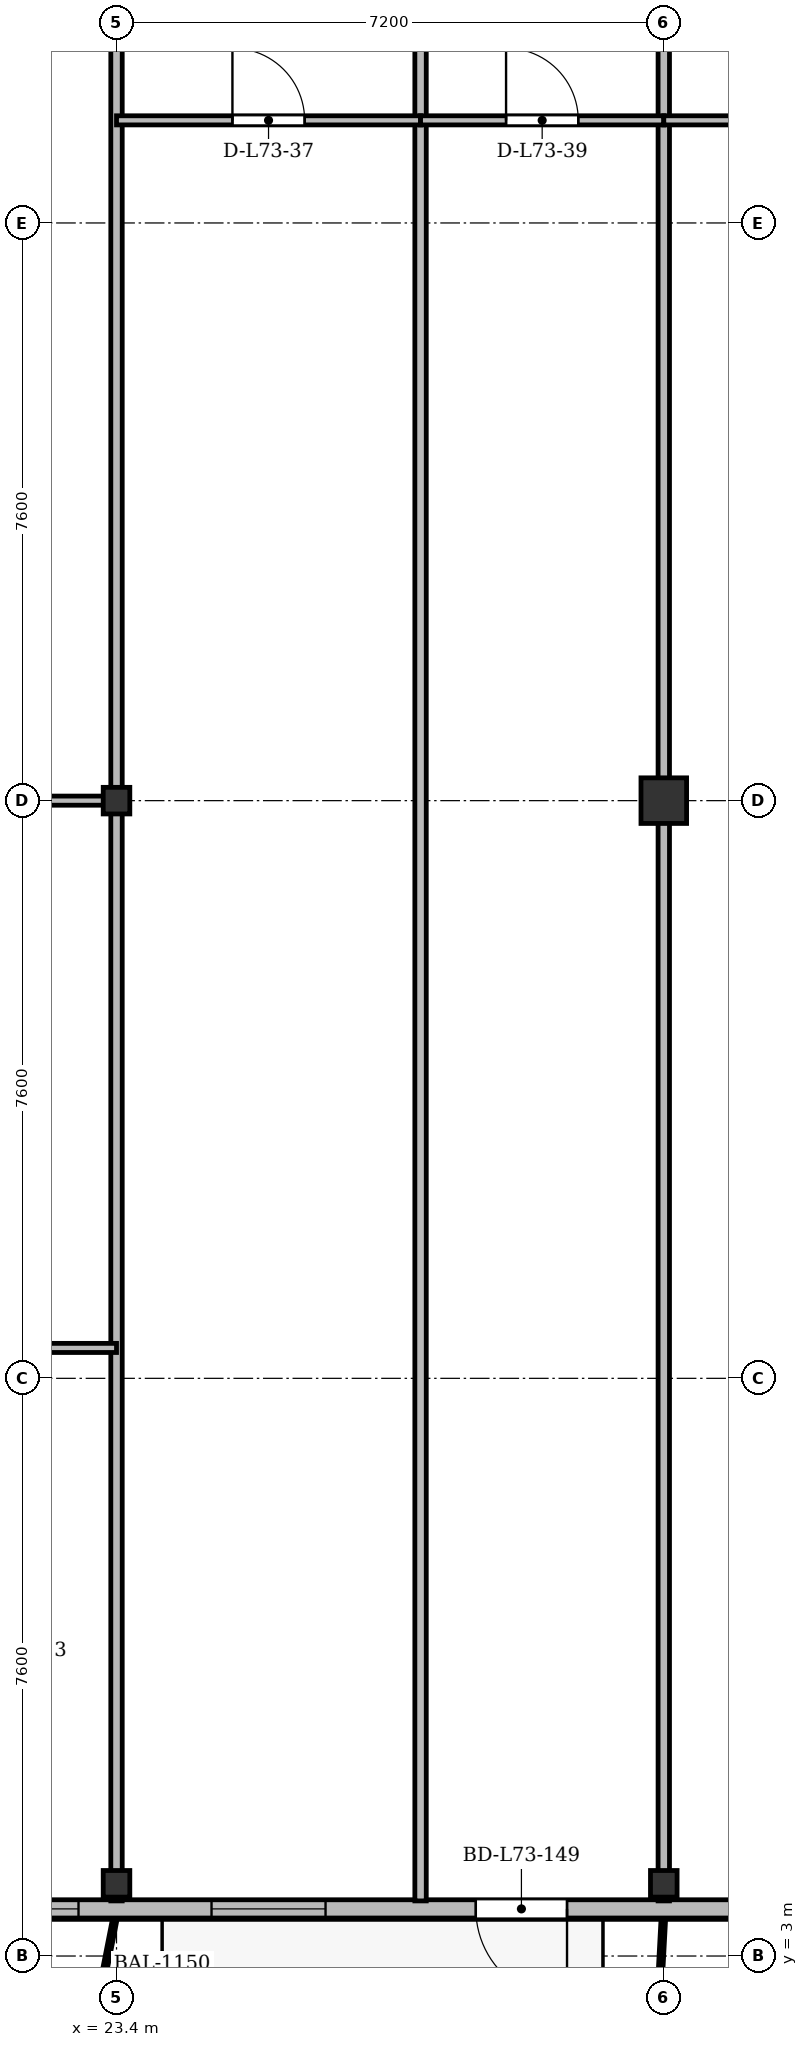
"""IFC4 building model, lengths in metres.
Left out: names, types, materials, properties, quantities, classifications, styles, units other than length and angle.
Written with IfcOpenShell. Run it as: python <this file> out.ifc"""

import sys

from ifc_helpers import new_model, si_unit, direction, frame, frame_2d, origin, origin_2d, place, context, subcontext, project, spatial, rectangle, i_section, extrude, source, transform, mapped, element, fill, save


model = new_model("IFC4")
c1 = context("Model", 3, precision=1e-05, world=origin(), true_north=direction((0.0, 1.0)))
c2 = subcontext(c1, "Body", "Model", "MODEL_VIEW")
j1 = project(units=[si_unit("LENGTHUNIT", "METRE"), si_unit("PLANEANGLEUNIT", "RADIAN")], contexts=[c1])
p1 = place(None, origin())
s1 = spatial("IfcSite", under=j1, at=p1, CompositionType="ELEMENT")
p2 = place(p1, origin())
s2 = spatial("IfcBuilding", under=s1, at=p2, CompositionType="ELEMENT")
p3 = place(p2, frame((0.0, 0.0, 281.1)))
s3 = spatial("IfcBuildingStorey", under=s2, at=p3, CompositionType="ELEMENT", Elevation=281.1)
m1 = source(origin(), c2, "Body", "SweptSolid", [
    extrude(i_section(OverallWidth=0.35, OverallDepth=0.35, WebThickness=0.018, FlangeThickness=0.028, at=origin_2d()), origin(), (0.0, 0.0, 1.0), 3.6),
])
for number, where, z_axis, x_axis in (
    (1, (23.4, 3.95, 0.0), (0.0, 0.0, 1.0), (1.0, 0.0, 0.0)),
    (2, (23.4, 18.2, 0.0), (0.0, 0.0, 1.0), (1.0, 0.0, 0.0)),
    (3, (30.6, 3.95, 0.0), (0.0, 0.0, 1.0), (1.0, 0.0, 0.0)),
):
    element("IfcColumn", number, at=place(p3, frame(where, z_axis=z_axis, x_axis=x_axis)), inside=s3, PredefinedType="COLUMN", context=c2, shape_type="MappedRepresentation", body=[
        mapped(m1, transform((0.0, 0.0, 0.0), x_axis=(1.0, 0.0, 0.0), y_axis=(0.0, 1.0, 0.0), z_axis=(0.0, 0.0, 1.0), scale=1.0)),
    ])
m2 = source(origin(), c2, "Body", "SweptSolid", [
    extrude(rectangle(XDim=0.6, YDim=0.6, at=origin_2d()), origin(), (0.0, 0.0, 1.0), 3.6),
])
p4 = place(p3, frame((30.6, 18.2, 0.0), z_axis=(0.0, 0.0, 1.0), x_axis=(1.0, 0.0, 0.0)))
e4 = element("IfcColumn", 4, at=p4, inside=s3, PredefinedType="COLUMN", context=c2, shape_type="MappedRepresentation", body=[
    mapped(m2, transform((0.0, 0.0, 0.0), x_axis=(1.0, 0.0, 0.0), y_axis=(0.0, 1.0, 0.0), z_axis=(0.0, 0.0, 1.0), scale=1.0)),
])
p5 = place(p3, frame((63.2, 3.62, 0.0), z_axis=(0.0, 0.0, 1.0), x_axis=(-1.0, 0.0, 0.0)))
e5 = element("IfcWall", 5, at=p5, inside=s3, PredefinedType="SOLIDWALL", context=c2, shape_type="SweptSolid", body=[
    extrude(rectangle(XDim=52.0, YDim=0.24, at=frame_2d((26.0, 0.0))), origin(), (0.0, 0.0, 1.0), 3.37),
])
p6 = place(p5, frame((0.745, 0.0, 0.9)))
e6 = element("IfcOpeningElement", 6, at=p6, cuts=e5, PredefinedType="OPENING", context=c2, shape_type="SweptSolid", body=[
    extrude(rectangle(XDim=2.0, YDim=1.95, at=frame_2d((1.0, 0.975))), frame((0.0, 0.13, 0.0), z_axis=(0.0, -1.0, 0.0), x_axis=(1.0, 0.0, 0.0)), (0.0, 0.0, 1.0), 0.26),
])
p7 = place(p5, frame((4.793, 0.0, 0.9)))
e7 = element("IfcOpeningElement", 7, at=p7, cuts=e5, PredefinedType="OPENING", context=c2, shape_type="SweptSolid", body=[
    extrude(rectangle(XDim=1.35, YDim=1.5, at=frame_2d((0.675, 0.75))), frame((0.0, 0.13, 0.0), z_axis=(0.0, -1.0, 0.0), x_axis=(1.0, 0.0, 0.0)), (0.0, 0.0, 1.0), 0.26),
])
p8 = place(p5, frame((6.685, 0.0, 0.0)))
e8 = element("IfcOpeningElement", 8, at=p8, cuts=e5, PredefinedType="OPENING", context=c2, shape_type="SweptSolid", body=[
    extrude(rectangle(XDim=1.2, YDim=2.2, at=frame_2d((0.6, 1.1))), frame((0.0, 0.13, 0.0), z_axis=(0.0, -1.0, 0.0), x_axis=(1.0, 0.0, 0.0)), (0.0, 0.0, 1.0), 0.26),
])
p9 = place(p5, frame((9.634, 0.0, 0.9)))
e9 = element("IfcOpeningElement", 9, at=p9, cuts=e5, PredefinedType="OPENING", context=c2, shape_type="SweptSolid", body=[
    extrude(rectangle(XDim=2.2, YDim=1.8, at=frame_2d((1.1, 0.9))), frame((0.0, 0.13, 0.0), z_axis=(0.0, -1.0, 0.0), x_axis=(1.0, 0.0, 0.0)), (0.0, 0.0, 1.0), 0.26),
])
p10 = place(p5, frame((13.45, 0.0, 0.9)))
e10 = element("IfcOpeningElement", 10, at=p10, cuts=e5, PredefinedType="OPENING", context=c2, shape_type="SweptSolid", body=[
    extrude(rectangle(XDim=1.5, YDim=1.75, at=frame_2d((0.75, 0.875))), frame((0.0, 0.13, 0.0), z_axis=(0.0, -1.0, 0.0), x_axis=(1.0, 0.0, 0.0)), (0.0, 0.0, 1.0), 0.26),
])
p11 = place(p5, frame((16.8, 0.0, 0.9)))
e11 = element("IfcOpeningElement", 11, at=p11, cuts=e5, PredefinedType="OPENING", context=c2, shape_type="SweptSolid", body=[
    extrude(rectangle(XDim=2.0, YDim=1.95, at=frame_2d((1.0, 0.975))), frame((0.0, 0.13, 0.0), z_axis=(0.0, -1.0, 0.0), x_axis=(1.0, 0.0, 0.0)), (0.0, 0.0, 1.0), 0.26),
])
p12 = place(p5, frame((21.375, 0.0, 0.9)))
e12 = element("IfcOpeningElement", 12, at=p12, cuts=e5, PredefinedType="OPENING", context=c2, shape_type="SweptSolid", body=[
    extrude(rectangle(XDim=1.65, YDim=1.85, at=frame_2d((0.825, 0.925))), frame((0.0, 0.13, 0.0), z_axis=(0.0, -1.0, 0.0), x_axis=(1.0, 0.0, 0.0)), (0.0, 0.0, 1.0), 0.26),
])
p13 = place(p5, frame((27.9, 0.0, 0.9)))
e13 = element("IfcOpeningElement", 13, at=p13, cuts=e5, PredefinedType="OPENING", context=c2, shape_type="SweptSolid", body=[
    extrude(rectangle(XDim=1.8, YDim=1.8, at=frame_2d((0.9, 0.9))), frame((0.0, 0.13, 0.0), z_axis=(0.0, -1.0, 0.0), x_axis=(1.0, 0.0, 0.0)), (0.0, 0.0, 1.0), 0.26),
])
p14 = place(p5, frame((33.873, 0.0, 0.0)))
e14 = element("IfcOpeningElement", 14, at=p14, cuts=e5, PredefinedType="OPENING", context=c2, shape_type="SweptSolid", body=[
    extrude(rectangle(XDim=1.2, YDim=2.2, at=frame_2d((0.6, 1.1))), frame((0.0, 0.13, 0.0), z_axis=(0.0, -1.0, 0.0), x_axis=(1.0, 0.0, 0.0)), (0.0, 0.0, 1.0), 0.26),
])
p15 = place(p5, frame((37.05, 0.0, 0.9)))
e15 = element("IfcOpeningElement", 15, at=p15, cuts=e5, PredefinedType="OPENING", context=c2, shape_type="SweptSolid", body=[
    extrude(rectangle(XDim=1.5, YDim=1.75, at=frame_2d((0.75, 0.875))), frame((0.0, 0.13, 0.0), z_axis=(0.0, -1.0, 0.0), x_axis=(1.0, 0.0, 0.0)), (0.0, 0.0, 1.0), 0.26),
])
p16 = place(p5, frame((40.3, 0.0, 0.9)))
e16 = element("IfcOpeningElement", 16, at=p16, cuts=e5, PredefinedType="OPENING", context=c2, shape_type="SweptSolid", body=[
    extrude(rectangle(XDim=2.0, YDim=1.95, at=frame_2d((1.0, 0.975))), frame((0.0, 0.13, 0.0), z_axis=(0.0, -1.0, 0.0), x_axis=(1.0, 0.0, 0.0)), (0.0, 0.0, 1.0), 0.26),
])
p17 = place(p5, frame((43.475, 0.0, 0.9)))
e17 = element("IfcOpeningElement", 17, at=p17, cuts=e5, PredefinedType="OPENING", context=c2, shape_type="SweptSolid", body=[
    extrude(rectangle(XDim=1.65, YDim=1.85, at=frame_2d((0.825, 0.925))), frame((0.0, 0.13, 0.0), z_axis=(0.0, -1.0, 0.0), x_axis=(1.0, 0.0, 0.0)), (0.0, 0.0, 1.0), 0.26),
])
p18 = place(p5, frame((45.99, 0.0, 0.9)))
e18 = element("IfcOpeningElement", 18, at=p18, cuts=e5, PredefinedType="OPENING", context=c2, shape_type="SweptSolid", body=[
    extrude(rectangle(XDim=1.2, YDim=1.65, at=frame_2d((0.6, 0.825))), frame((0.0, 0.13, 0.0), z_axis=(0.0, -1.0, 0.0), x_axis=(1.0, 0.0, 0.0)), (0.0, 0.0, 1.0), 0.26),
])
p19 = place(p5, frame((49.255, 0.0, 0.9)))
e19 = element("IfcOpeningElement", 19, at=p19, cuts=e5, PredefinedType="OPENING", context=c2, shape_type="SweptSolid", body=[
    extrude(rectangle(XDim=2.2, YDim=1.8, at=frame_2d((1.1, 0.9))), frame((0.0, 0.13, 0.0), z_axis=(0.0, -1.0, 0.0), x_axis=(1.0, 0.0, 0.0)), (0.0, 0.0, 1.0), 0.26),
])
p20 = place(p3, frame((23.4, 3.725, 0.0), z_axis=(0.0, 0.0, 1.0), x_axis=(0.0, 1.0, 0.0)))
e20 = element("IfcWall", 20, at=p20, inside=s3, PredefinedType="PARTITIONING", context=c2, shape_type="SweptSolid", body=[
    extrude(rectangle(XDim=27.275, YDim=0.15, at=frame_2d((13.637, 0.0))), origin(), (0.0, 0.0, 1.0), 2.87),
])
p21 = place(p3, frame((27.4, 3.725, 0.0), z_axis=(0.0, 0.0, 1.0), x_axis=(0.0, 1.0, 0.0)))
e21 = element("IfcWall", 21, at=p21, inside=s3, PredefinedType="PARTITIONING", context=c2, shape_type="SweptSolid", body=[
    extrude(rectangle(XDim=27.275, YDim=0.15, at=frame_2d((13.637, 0.0))), origin(), (0.0, 0.0, 1.0), 2.92),
])
p22 = place(p3, frame((30.6, 3.725, 0.0), z_axis=(0.0, 0.0, 1.0), x_axis=(0.0, 1.0, 0.0)))
e22 = element("IfcWall", 22, at=p22, inside=s3, PredefinedType="PARTITIONING", context=c2, shape_type="SweptSolid", body=[
    extrude(rectangle(XDim=27.275, YDim=0.15, at=frame_2d((13.637, 0.0))), origin(), (0.0, 0.0, 1.0), 2.87),
])
p23 = place(p3, frame((14.4, 18.2, 0.0), z_axis=(0.0, 0.0, 1.0), x_axis=(1.0, 0.0, 0.0)))
e23 = element("IfcWall", 23, at=p23, inside=s3, PredefinedType="PARTITIONING", context=c2, shape_type="SweptSolid", body=[
    extrude(rectangle(XDim=9.0, YDim=0.12, at=frame_2d((4.5, 0.0))), origin(), (0.0, 0.0, 1.0), 2.92),
])
p24 = place(p23, frame((4.025, 0.0, 0.0)))
e24 = element("IfcOpeningElement", 24, at=p24, cuts=e23, PredefinedType="OPENING", context=c2, shape_type="SweptSolid", body=[
    extrude(rectangle(XDim=0.95, YDim=2.15, at=frame_2d((0.475, 1.075))), frame((0.0, 0.07, 0.0), z_axis=(0.0, -1.0, 0.0), x_axis=(1.0, 0.0, 0.0)), (0.0, 0.0, 1.0), 0.14),
])
p25 = place(p3, frame((20.4, 11.0, 0.0), z_axis=(0.0, 0.0, 1.0), x_axis=(1.0, 0.0, 0.0)))
e25 = element("IfcWall", 25, at=p25, inside=s3, PredefinedType="PARTITIONING", context=c2, shape_type="SweptSolid", body=[
    extrude(rectangle(XDim=3.0, YDim=0.12, at=frame_2d((1.5, 0.0))), origin(), (0.0, 0.0, 1.0), 2.87),
])
p26 = place(p25, frame((1.025, 0.0, 0.0)))
e26 = element("IfcOpeningElement", 26, at=p26, cuts=e25, PredefinedType="OPENING", context=c2, shape_type="SweptSolid", body=[
    extrude(rectangle(XDim=0.95, YDim=2.15, at=frame_2d((0.475, 1.075))), frame((0.0, 0.07, 0.0), z_axis=(0.0, -1.0, 0.0), x_axis=(1.0, 0.0, 0.0)), (0.0, 0.0, 1.0), 0.14),
])
p27 = place(p3, frame((23.4, 27.15, 0.0), z_axis=(0.0, 0.0, 1.0), x_axis=(1.0, 0.0, 0.0)))
e27 = element("IfcWall", 27, at=p27, inside=s3, PredefinedType="PARTITIONING", context=c2, shape_type="SweptSolid", body=[
    extrude(rectangle(XDim=4.0, YDim=0.12, at=frame_2d((2.0, 0.0))), origin(), (0.0, 0.0, 1.0), 2.87),
])
p28 = place(p27, frame((1.525, 0.0, 0.0)))
e28 = element("IfcOpeningElement", 28, at=p28, cuts=e27, PredefinedType="OPENING", context=c2, shape_type="SweptSolid", body=[
    extrude(rectangle(XDim=0.95, YDim=2.15, at=frame_2d((0.475, 1.075))), frame((0.0, 0.07, 0.0), z_axis=(0.0, -1.0, 0.0), x_axis=(1.0, 0.0, 0.0)), (0.0, 0.0, 1.0), 0.14),
])
p29 = place(p3, frame((27.4, 27.15, 0.0), z_axis=(0.0, 0.0, 1.0), x_axis=(1.0, 0.0, 0.0)))
e29 = element("IfcWall", 29, at=p29, inside=s3, PredefinedType="PARTITIONING", context=c2, shape_type="SweptSolid", body=[
    extrude(rectangle(XDim=3.2, YDim=0.12, at=frame_2d((1.6, 0.0))), origin(), (0.0, 0.0, 1.0), 2.87),
])
p30 = place(p29, frame((1.125, 0.0, 0.0)))
e30 = element("IfcOpeningElement", 30, at=p30, cuts=e29, PredefinedType="OPENING", context=c2, shape_type="SweptSolid", body=[
    extrude(rectangle(XDim=0.95, YDim=2.15, at=frame_2d((0.475, 1.075))), frame((0.0, 0.07, 0.0), z_axis=(0.0, -1.0, 0.0), x_axis=(1.0, 0.0, 0.0)), (0.0, 0.0, 1.0), 0.14),
])
p31 = place(p3, frame((30.6, 27.15, 0.0), z_axis=(0.0, 0.0, 1.0), x_axis=(1.0, 0.0, 0.0)))
e31 = element("IfcWall", 31, at=p31, inside=s3, PredefinedType="PARTITIONING", context=c2, shape_type="SweptSolid", body=[
    extrude(rectangle(XDim=7.6, YDim=0.12, at=frame_2d((3.8, 0.0))), origin(), (0.0, 0.0, 1.0), 2.87),
])
p32 = place(p31, frame((3.325, 0.0, 0.0)))
e32 = element("IfcOpeningElement", 32, at=p32, cuts=e31, PredefinedType="OPENING", context=c2, shape_type="SweptSolid", body=[
    extrude(rectangle(XDim=0.95, YDim=2.15, at=frame_2d((0.475, 1.075))), frame((0.0, 0.07, 0.0), z_axis=(0.0, -1.0, 0.0), x_axis=(1.0, 0.0, 0.0)), (0.0, 0.0, 1.0), 0.14),
])
m3 = source(origin(), c2, "Body", "SweptSolid", [
    extrude(rectangle(XDim=1.2, YDim=2.2, at=frame_2d((0.6, 1.1))), frame((0.0, 0.025, 0.0), z_axis=(0.0, -1.0, 0.0), x_axis=(1.0, 0.0, 0.0)), (0.0, 0.0, 1.0), 0.05),
])
p33 = place(p14, origin())
e33 = element("IfcDoor", 33, at=p33, inside=s3, OperationType="SINGLE_SWING_LEFT", PredefinedType="DOOR", context=c2, shape_type="MappedRepresentation", body=[
    mapped(m3, transform((0.0, 0.0, 0.0), x_axis=(1.0, 0.0, 0.0), y_axis=(0.0, 1.0, 0.0), z_axis=(0.0, 0.0, 1.0), scale=1.0)),
])
fill(e14, e33)
m4 = source(origin(), c2, "Body", "SweptSolid", [
    extrude(rectangle(XDim=1.5, YDim=1.75, at=frame_2d((0.75, 0.875))), frame((0.0, 0.03, 0.0), z_axis=(0.0, -1.0, 0.0), x_axis=(1.0, 0.0, 0.0)), (0.0, 0.0, 1.0), 0.06),
])
p34 = place(p15, origin())
e34 = element("IfcWindow", 34, at=p34, inside=s3, PartitioningType="SINGLE_PANEL", PredefinedType="WINDOW", context=c2, shape_type="MappedRepresentation", body=[
    mapped(m4, transform((0.0, 0.0, 0.0), x_axis=(1.0, 0.0, 0.0), y_axis=(0.0, 1.0, 0.0), z_axis=(0.0, 0.0, 1.0), scale=1.0)),
])
fill(e15, e34)
m5 = source(origin(), c2, "Body", "SweptSolid", [
    extrude(rectangle(XDim=2.0, YDim=1.95, at=frame_2d((1.0, 0.975))), frame((0.0, 0.03, 0.0), z_axis=(0.0, -1.0, 0.0), x_axis=(1.0, 0.0, 0.0)), (0.0, 0.0, 1.0), 0.06),
])
p35 = place(p16, origin())
e35 = element("IfcWindow", 35, at=p35, inside=s3, PartitioningType="SINGLE_PANEL", PredefinedType="WINDOW", context=c2, shape_type="MappedRepresentation", body=[
    mapped(m5, transform((0.0, 0.0, 0.0), x_axis=(1.0, 0.0, 0.0), y_axis=(0.0, 1.0, 0.0), z_axis=(0.0, 0.0, 1.0), scale=1.0)),
])
fill(e16, e35)
m6 = source(origin(), c2, "Body", "SweptSolid", [
    extrude(rectangle(XDim=0.95, YDim=2.15, at=frame_2d((0.475, 1.075))), frame((0.0, 0.025, 0.0), z_axis=(0.0, -1.0, 0.0), x_axis=(1.0, 0.0, 0.0)), (0.0, 0.0, 1.0), 0.05),
])
p36 = place(p28, origin())
e36 = element("IfcDoor", 36, at=p36, inside=s3, OperationType="SINGLE_SWING_LEFT", PredefinedType="DOOR", context=c2, shape_type="MappedRepresentation", body=[
    mapped(m6, transform((0.0, 0.0, 0.0), x_axis=(1.0, 0.0, 0.0), y_axis=(0.0, 1.0, 0.0), z_axis=(0.0, 0.0, 1.0), scale=1.0)),
])
fill(e28, e36)
p37 = place(p30, origin())
e37 = element("IfcDoor", 37, at=p37, inside=s3, OperationType="SINGLE_SWING_LEFT", PredefinedType="DOOR", context=c2, shape_type="MappedRepresentation", body=[
    mapped(m6, transform((0.0, 0.0, 0.0), x_axis=(1.0, 0.0, 0.0), y_axis=(0.0, 1.0, 0.0), z_axis=(0.0, 0.0, 1.0), scale=1.0)),
])
fill(e30, e37)
save(model, sys.argv[1])
